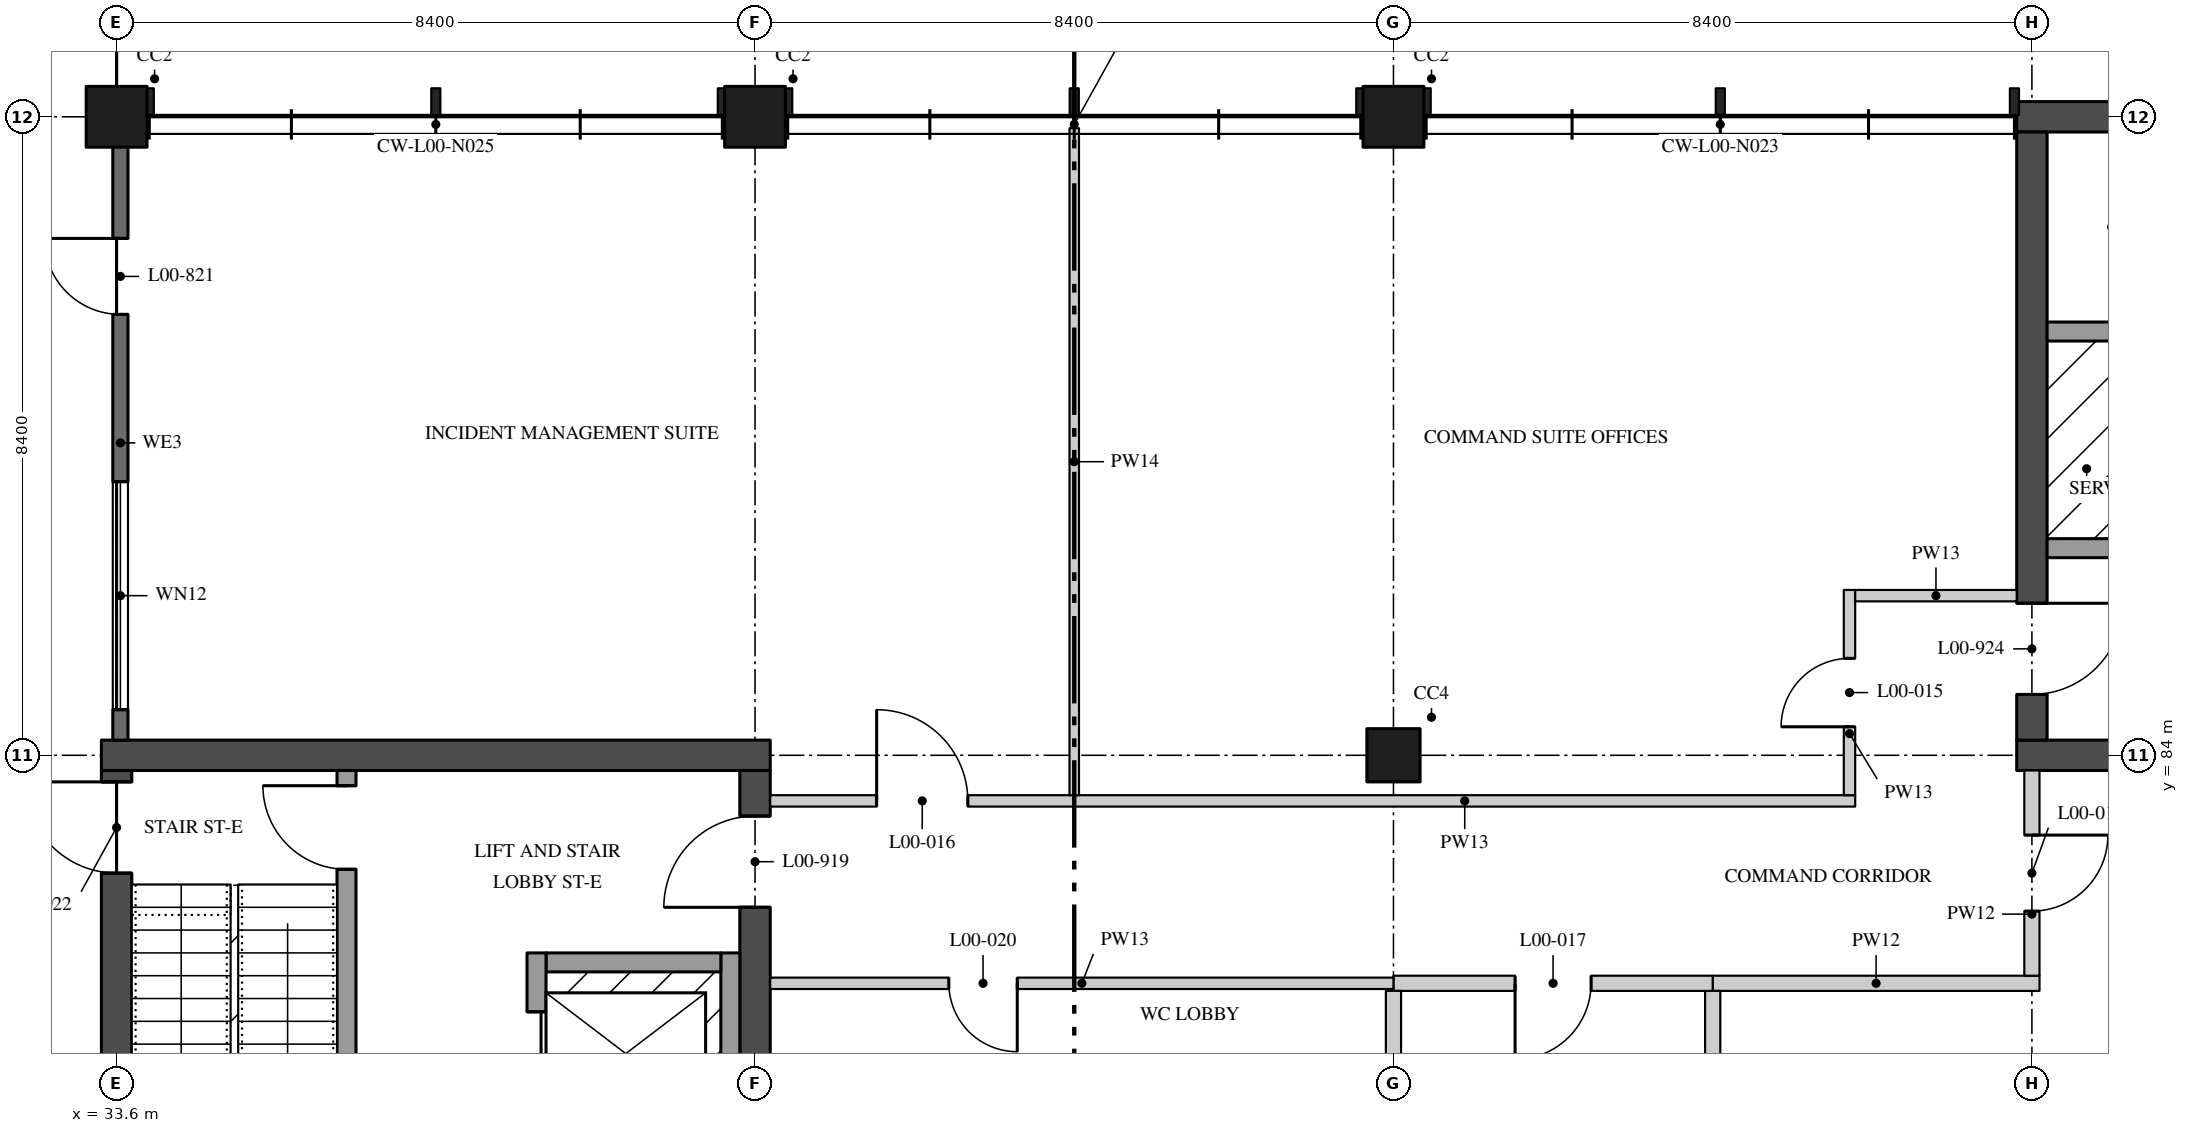
"""IFC4 building model, lengths in metres.
Left out: names, types, materials, properties, quantities, classifications, styles, units other than length and angle.
Written with IfcOpenShell. Run it as: python <this file> out.ifc"""

import sys

from ifc_helpers import new_model, si_unit, direction, frame, frame_2d, origin, origin_2d, place, context, subcontext, project, spatial, rectangle, extrude, element, fill, save


model = new_model("IFC4")
c1 = context("Model", 3, precision=1e-05, world=origin(), true_north=direction((0.0, 1.0)))
c2 = subcontext(c1, "Body", "Model", "MODEL_VIEW")
j1 = project(units=[si_unit("LENGTHUNIT", "METRE"), si_unit("PLANEANGLEUNIT", "RADIAN")], contexts=[c1])
p1 = place(None, origin())
s1 = spatial("IfcSite", under=j1, at=p1, CompositionType="ELEMENT")
p2 = place(p1, origin())
s2 = spatial("IfcBuilding", under=s1, at=p2, CompositionType="ELEMENT")
p3 = place(p2, origin())
s3 = spatial("IfcBuildingStorey", under=s2, at=p3, CompositionType="ELEMENT", Elevation=0.0)
for number, where, z_axis, x_axis in (
    (1, (33.6, 92.4, 0.0), (0.0, 0.0, 1.0), (1.0, 0.0, 0.0)),
    (2, (42.0, 92.4, 0.0), (0.0, 0.0, 1.0), (1.0, 0.0, 0.0)),
):
    element("IfcColumn", number, at=place(p3, frame(where, z_axis=z_axis, x_axis=x_axis)), inside=s3, PredefinedType="COLUMN", context=c2, shape_type="SweptSolid", body=[
        extrude(rectangle(XDim=0.8, YDim=0.8, at=origin_2d()), origin(), (0.0, 0.0, 1.0), 5.05),
    ])
p4 = place(p3, frame((50.4, 84.0, 0.0), z_axis=(0.0, 0.0, 1.0), x_axis=(1.0, 0.0, 0.0)))
e3 = element("IfcColumn", 3, at=p4, inside=s3, PredefinedType="COLUMN", context=c2, shape_type="SweptSolid", body=[
    extrude(rectangle(XDim=0.7, YDim=0.7, at=origin_2d()), origin(), (0.0, 0.0, 1.0), 5.05),
])
p5 = place(p3, frame((50.4, 92.4, 0.0), z_axis=(0.0, 0.0, 1.0), x_axis=(1.0, 0.0, 0.0)))
e4 = element("IfcColumn", 4, at=p5, inside=s3, PredefinedType="COLUMN", context=c2, shape_type="SweptSolid", body=[
    extrude(rectangle(XDim=0.8, YDim=0.8, at=origin_2d()), origin(), (0.0, 0.0, 1.0), 5.05),
])
p6 = place(p3, frame((33.4, 84.0, 0.0), z_axis=(0.0, 0.0, 1.0), x_axis=(1.0, 0.0, 0.0)))
e5 = element("IfcWall", 5, at=p6, inside=s3, PredefinedType="SHEAR", context=c2, shape_type="SweptSolid", body=[
    extrude(rectangle(XDim=8.8, YDim=0.4, at=frame_2d((4.4, 0.0))), origin(), (0.0, 0.0, 1.0), 5.05),
])
p7 = place(p3, frame((33.6, 75.8, 0.0), z_axis=(0.0, 0.0, 1.0), x_axis=(0.0, 1.0, 0.0)))
e6 = element("IfcWall", 6, at=p7, inside=s3, PredefinedType="SHEAR", context=c2, shape_type="SweptSolid", body=[
    extrude(rectangle(XDim=8.0, YDim=0.4, at=frame_2d((4.0, 0.0))), origin(), (0.0, 0.0, 1.0), 5.05),
])
p8 = place(p7, frame((6.65, 0.0, 0.0)))
e7 = element("IfcOpeningElement", 7, at=p8, cuts=e6, PredefinedType="OPENING", context=c2, shape_type="SweptSolid", body=[
    extrude(rectangle(XDim=1.2, YDim=2.1, at=frame_2d((0.6, 1.05))), frame((0.0, 0.21, 0.0), z_axis=(0.0, -1.0, 0.0), x_axis=(1.0, 0.0, 0.0)), (0.0, 0.0, 1.0), 0.42),
])
p9 = place(p3, frame((42.0, 75.8, 0.0), z_axis=(0.0, 0.0, 1.0), x_axis=(0.0, 1.0, 0.0)))
e8 = element("IfcWall", 8, at=p9, inside=s3, PredefinedType="SHEAR", context=c2, shape_type="SweptSolid", body=[
    extrude(rectangle(XDim=8.0, YDim=0.4, at=frame_2d((4.0, 0.0))), origin(), (0.0, 0.0, 1.0), 5.05),
])
p10 = place(p9, frame((6.2, 0.0, 0.0)))
e9 = element("IfcOpeningElement", 9, at=p10, cuts=e8, PredefinedType="OPENING", context=c2, shape_type="SweptSolid", body=[
    extrude(rectangle(XDim=1.2, YDim=2.1, at=frame_2d((0.6, 1.05))), frame((0.0, 0.21, 0.0), z_axis=(0.0, -1.0, 0.0), x_axis=(1.0, 0.0, 0.0)), (0.0, 0.0, 1.0), 0.42),
])
p11 = place(p3, frame((36.625, 83.8, 0.0), z_axis=(0.0, 0.0, 1.0), x_axis=(0.0, -1.0, 0.0)))
e10 = element("IfcWall", 10, at=p11, inside=s3, PredefinedType="SOLIDWALL", context=c2, shape_type="SweptSolid", body=[
    extrude(rectangle(XDim=8.0, YDim=0.25, at=frame_2d((4.0, 0.0))), origin(), (0.0, 0.0, 1.0), 5.05),
])
p12 = place(p11, frame((0.2, 0.0, 0.0)))
e11 = element("IfcOpeningElement", 11, at=p12, cuts=e10, PredefinedType="OPENING", context=c2, shape_type="SweptSolid", body=[
    extrude(rectangle(XDim=1.1, YDim=2.1, at=frame_2d((0.55, 1.05))), frame((0.0, 0.135, 0.0), z_axis=(0.0, -1.0, 0.0), x_axis=(1.0, 0.0, 0.0)), (0.0, 0.0, 1.0), 0.27),
])
for number, where, z_axis, x_axis in (
    (12, (58.6, 84.0, 0.0), (0.0, 0.0, 1.0), (1.0, 0.0, 0.0)),
    (13, (58.6, 92.4, 0.0), (0.0, 0.0, 1.0), (1.0, 0.0, 0.0)),
):
    element("IfcWall", number, at=place(p3, frame(where, z_axis=z_axis, x_axis=x_axis)), inside=s3, PredefinedType="SHEAR", context=c2, shape_type="SweptSolid", body=[
        extrude(rectangle(XDim=8.8, YDim=0.4, at=frame_2d((4.4, 0.0))), origin(), (0.0, 0.0, 1.0), 5.05),
    ])
p13 = place(p3, frame((58.8, 84.2, 0.0), z_axis=(0.0, 0.0, 1.0), x_axis=(0.0, 1.0, 0.0)))
e14 = element("IfcWall", 14, at=p13, inside=s3, PredefinedType="SHEAR", context=c2, shape_type="SweptSolid", body=[
    extrude(rectangle(XDim=8.0, YDim=0.4, at=frame_2d((4.0, 0.0))), origin(), (0.0, 0.0, 1.0), 5.05),
])
p14 = place(p13, frame((0.6, 0.0, 0.0)))
e15 = element("IfcOpeningElement", 15, at=p14, cuts=e14, PredefinedType="OPENING", context=c2, shape_type="SweptSolid", body=[
    extrude(rectangle(XDim=1.2, YDim=2.1, at=frame_2d((0.6, 1.05))), frame((0.0, 0.21, 0.0), z_axis=(0.0, -1.0, 0.0), x_axis=(1.0, 0.0, 0.0)), (0.0, 0.0, 1.0), 0.42),
])
p15 = place(p3, frame((61.8, 86.725, 0.0), z_axis=(0.0, 0.0, 1.0), x_axis=(-1.0, 0.0, 0.0)))
e16 = element("IfcWall", 16, at=p15, inside=s3, PredefinedType="SOLIDWALL", context=c2, shape_type="SweptSolid", body=[
    extrude(rectangle(XDim=2.8, YDim=0.25, at=frame_2d((1.4, 0.0))), origin(), (0.0, 0.0, 1.0), 5.05),
])
p16 = place(p3, frame((61.55, 89.575, 0.0), z_axis=(0.0, 0.0, 1.0), x_axis=(-1.0, 0.0, 0.0)))
e17 = element("IfcWall", 17, at=p16, inside=s3, PredefinedType="SOLIDWALL", context=c2, shape_type="SweptSolid", body=[
    extrude(rectangle(XDim=2.55, YDim=0.25, at=frame_2d((1.275, 0.0))), origin(), (0.0, 0.0, 1.0), 5.05),
])
p17 = place(p3, frame((41.675, 78.75, 0.0), z_axis=(0.0, 0.0, 1.0), x_axis=(0.0, 1.0, 0.0)))
e18 = element("IfcWall", 18, at=p17, inside=s3, PredefinedType="SOLIDWALL", context=c2, shape_type="SweptSolid", body=[
    extrude(rectangle(XDim=2.65, YDim=0.25, at=frame_2d((1.325, 0.0))), origin(), (0.0, 0.0, 1.0), 5.05),
])
p18 = place(p3, frame((39.25, 81.275, 0.0), z_axis=(0.0, 0.0, 1.0), x_axis=(1.0, 0.0, 0.0)))
e19 = element("IfcWall", 19, at=p18, inside=s3, PredefinedType="SOLIDWALL", context=c2, shape_type="SweptSolid", body=[
    extrude(rectangle(XDim=2.3, YDim=0.25, at=frame_2d((1.15, 0.0))), origin(), (0.0, 0.0, 1.0), 5.05),
])
p19 = place(p3, frame((39.125, 78.75, 0.0), z_axis=(0.0, 0.0, 1.0), x_axis=(0.0, 1.0, 0.0)))
e20 = element("IfcWall", 20, at=p19, inside=s3, PredefinedType="SOLIDWALL", context=c2, shape_type="SweptSolid", body=[
    extrude(rectangle(XDim=2.65, YDim=0.25, at=frame_2d((1.325, 0.0))), origin(), (0.0, 0.0, 1.0), 5.05),
])
p20 = place(p19, frame((0.775, 0.0, 0.0)))
e21 = element("IfcOpeningElement", 21, at=p20, cuts=e20, PredefinedType="OPENING", context=c2, shape_type="SweptSolid", body=[
    extrude(rectangle(XDim=1.1, YDim=2.1, at=frame_2d((0.55, 1.05))), frame((0.0, 0.135, 0.0), z_axis=(0.0, -1.0, 0.0), x_axis=(1.0, 0.0, 0.0)), (0.0, 0.0, 1.0), 0.27),
])
p21 = place(p3, frame((54.6, 81.0, 0.0), z_axis=(0.0, 0.0, 1.0), x_axis=(1.0, 0.0, 0.0)))
e22 = element("IfcWall", 22, at=p21, inside=s3, PredefinedType="PARTITIONING", context=c2, shape_type="SweptSolid", body=[
    extrude(rectangle(XDim=4.3, YDim=0.2, at=frame_2d((2.15, 0.0))), origin(), (0.0, 0.0, 1.0), 5.05),
])
p22 = place(p3, frame((58.8, 81.1, 0.0), z_axis=(0.0, 0.0, 1.0), x_axis=(0.0, 1.0, 0.0)))
e23 = element("IfcWall", 23, at=p22, inside=s3, PredefinedType="PARTITIONING", context=c2, shape_type="SweptSolid", body=[
    extrude(rectangle(XDim=2.7, YDim=0.2, at=frame_2d((1.35, 0.0))), origin(), (0.0, 0.0, 1.0), 5.05),
])
p23 = place(p22, frame((0.85, 0.0, 0.0)))
e24 = element("IfcOpeningElement", 24, at=p23, cuts=e23, PredefinedType="OPENING", context=c2, shape_type="SweptSolid", body=[
    extrude(rectangle(XDim=1.0, YDim=2.1, at=frame_2d((0.5, 1.05))), frame((0.0, 0.11, 0.0), z_axis=(0.0, -1.0, 0.0), x_axis=(1.0, 0.0, 0.0)), (0.0, 0.0, 1.0), 0.22),
])
p24 = place(p3, frame((54.6, 75.75, 0.0), z_axis=(0.0, 0.0, 1.0), x_axis=(0.0, 1.0, 0.0)))
e25 = element("IfcWall", 25, at=p24, inside=s3, PredefinedType="PARTITIONING", context=c2, shape_type="SweptSolid", body=[
    extrude(rectangle(XDim=5.15, YDim=0.2, at=frame_2d((2.575, 0.0))), origin(), (0.0, 0.0, 1.0), 5.05),
])
p25 = place(p3, frame((46.2, 83.4, 0.0), z_axis=(0.0, 0.0, 1.0), x_axis=(1.0, 0.0, 0.0)))
e26 = element("IfcWall", 26, at=p25, inside=s3, PredefinedType="PARTITIONING", context=c2, shape_type="SweptSolid", body=[
    extrude(rectangle(XDim=10.275, YDim=0.15, at=frame_2d((5.138, 0.0))), origin(), (0.0, 0.0, 1.0), 5.05),
])
p26 = place(p3, frame((56.4, 83.475, 0.0), z_axis=(0.0, 0.0, 1.0), x_axis=(0.0, 1.0, 0.0)))
e27 = element("IfcWall", 27, at=p26, inside=s3, PredefinedType="PARTITIONING", context=c2, shape_type="SweptSolid", body=[
    extrude(rectangle(XDim=2.7, YDim=0.15, at=frame_2d((1.35, 0.0))), origin(), (0.0, 0.0, 1.0), 5.05),
])
p27 = place(p26, frame((0.9, 0.0, 0.0)))
e28 = element("IfcOpeningElement", 28, at=p27, cuts=e27, PredefinedType="OPENING", context=c2, shape_type="SweptSolid", body=[
    extrude(rectangle(XDim=0.9, YDim=2.1, at=frame_2d((0.45, 1.05))), frame((0.0, 0.085, 0.0), z_axis=(0.0, -1.0, 0.0), x_axis=(1.0, 0.0, 0.0)), (0.0, 0.0, 1.0), 0.17),
])
p28 = place(p3, frame((56.475, 86.1, 0.0), z_axis=(0.0, 0.0, 1.0), x_axis=(1.0, 0.0, 0.0)))
e29 = element("IfcWall", 29, at=p28, inside=s3, PredefinedType="PARTITIONING", context=c2, shape_type="SweptSolid", body=[
    extrude(rectangle(XDim=2.125, YDim=0.15, at=frame_2d((1.062, 0.0))), origin(), (0.0, 0.0, 1.0), 5.05),
])
p29 = place(p3, frame((42.2, 83.4, 0.0), z_axis=(0.0, 0.0, 1.0), x_axis=(1.0, 0.0, 0.0)))
e30 = element("IfcWall", 30, at=p29, inside=s3, PredefinedType="PARTITIONING", context=c2, shape_type="SweptSolid", body=[
    extrude(rectangle(XDim=4.0, YDim=0.15, at=frame_2d((2.0, 0.0))), origin(), (0.0, 0.0, 1.0), 5.05),
])
p30 = place(p29, frame((1.4, 0.0, 0.0)))
e31 = element("IfcOpeningElement", 31, at=p30, cuts=e30, PredefinedType="OPENING", context=c2, shape_type="SweptSolid", body=[
    extrude(rectangle(XDim=1.2, YDim=2.4, at=frame_2d((0.6, 1.2))), frame((0.0, 0.085, 0.0), z_axis=(0.0, -1.0, 0.0), x_axis=(1.0, 0.0, 0.0)), (0.0, 0.0, 1.0), 0.17),
])
p31 = place(p3, frame((50.4, 81.0, 0.0), z_axis=(0.0, 0.0, 1.0), x_axis=(1.0, 0.0, 0.0)))
e32 = element("IfcWall", 32, at=p31, inside=s3, PredefinedType="PARTITIONING", context=c2, shape_type="SweptSolid", body=[
    extrude(rectangle(XDim=4.2, YDim=0.2, at=frame_2d((2.1, 0.0))), origin(), (0.0, 0.0, 1.0), 5.05),
])
p32 = place(p31, frame((1.6, 0.0, 0.0)))
e33 = element("IfcOpeningElement", 33, at=p32, cuts=e32, PredefinedType="OPENING", context=c2, shape_type="SweptSolid", body=[
    extrude(rectangle(XDim=1.0, YDim=2.1, at=frame_2d((0.5, 1.05))), frame((0.0, 0.11, 0.0), z_axis=(0.0, -1.0, 0.0), x_axis=(1.0, 0.0, 0.0)), (0.0, 0.0, 1.0), 0.22),
])
p33 = place(p3, frame((42.2, 81.0, 0.0), z_axis=(0.0, 0.0, 1.0), x_axis=(1.0, 0.0, 0.0)))
e34 = element("IfcWall", 34, at=p33, inside=s3, PredefinedType="PARTITIONING", context=c2, shape_type="SweptSolid", body=[
    extrude(rectangle(XDim=8.2, YDim=0.15, at=frame_2d((4.1, 0.0))), origin(), (0.0, 0.0, 1.0), 5.05),
])
p34 = place(p33, frame((2.35, 0.0, 0.0)))
e35 = element("IfcOpeningElement", 35, at=p34, cuts=e34, PredefinedType="OPENING", context=c2, shape_type="SweptSolid", body=[
    extrude(rectangle(XDim=0.9, YDim=2.1, at=frame_2d((0.45, 1.05))), frame((0.0, 0.085, 0.0), z_axis=(0.0, -1.0, 0.0), x_axis=(1.0, 0.0, 0.0)), (0.0, 0.0, 1.0), 0.17),
])
p35 = place(p3, frame((46.2, 83.475, 0.0), z_axis=(0.0, 0.0, 1.0), x_axis=(0.0, 1.0, 0.0)))
e36 = element("IfcWall", 36, at=p35, inside=s3, PredefinedType="PARTITIONING", context=c2, shape_type="SweptSolid", body=[
    extrude(rectangle(XDim=8.775, YDim=0.125, at=frame_2d((4.387, 0.0))), origin(), (0.0, 0.0, 1.0), 5.05),
])
p36 = place(p3, frame((50.4, 78.6, 0.0), z_axis=(0.0, 0.0, 1.0), x_axis=(0.0, 1.0, 0.0)))
e37 = element("IfcWall", 37, at=p36, inside=s3, PredefinedType="PARTITIONING", context=c2, shape_type="SweptSolid", body=[
    extrude(rectangle(XDim=2.3, YDim=0.2, at=frame_2d((1.15, 0.0))), origin(), (0.0, 0.0, 1.0), 5.05),
])
p37 = place(p3, frame((33.65, 92.02, 0.0), z_axis=(0.0, 0.0, 1.0), x_axis=(0.0, -1.0, 0.0)))
e38 = element("IfcWall", 38, at=p37, inside=s3, PredefinedType="SOLIDWALL", context=c2, shape_type="SweptSolid", body=[
    extrude(rectangle(XDim=7.82, YDim=0.2, at=frame_2d((3.91, 0.0))), origin(), (0.0, 0.0, 1.0), 5.05),
])
p38 = place(p37, frame((1.22, 0.0, 0.0)))
e39 = element("IfcOpeningElement", 39, at=p38, cuts=e38, PredefinedType="OPENING", context=c2, shape_type="SweptSolid", body=[
    extrude(rectangle(XDim=1.0, YDim=2.4, at=frame_2d((0.5, 1.2))), frame((0.0, 0.11, 0.0), z_axis=(0.0, -1.0, 0.0), x_axis=(1.0, 0.0, 0.0)), (0.0, 0.0, 1.0), 0.22),
])
p39 = place(p37, frame((4.42, 0.0, 0.9)))
e40 = element("IfcOpeningElement", 40, at=p39, cuts=e38, PredefinedType="OPENING", context=c2, shape_type="SweptSolid", body=[
    extrude(rectangle(XDim=3.0, YDim=2.85, at=frame_2d((1.5, 1.425))), frame((0.0, 0.11, 0.0), z_axis=(0.0, -1.0, 0.0), x_axis=(1.0, 0.0, 0.0)), (0.0, 0.0, 1.0), 0.22),
])
p40 = place(p10, origin())
e41 = element("IfcDoor", 41, at=p40, inside=s3, OperationType="SINGLE_SWING_RIGHT", PredefinedType="DOOR", context=c2, shape_type="SweptSolid", body=[
    extrude(rectangle(XDim=1.2, YDim=2.1, at=frame_2d((0.6, 1.05))), frame((0.0, 0.035, 0.0), z_axis=(0.0, -1.0, 0.0), x_axis=(1.0, 0.0, 0.0)), (0.0, 0.0, 1.0), 0.07),
])
fill(e9, e41)
p41 = place(p12, frame((1.1, 0.0, 0.0), z_axis=(0.0, 0.0, 1.0), x_axis=(-1.0, 0.0, 0.0)))
e42 = element("IfcDoor", 42, at=p41, inside=s3, OperationType="SINGLE_SWING_LEFT", PredefinedType="DOOR", context=c2, shape_type="SweptSolid", body=[
    extrude(rectangle(XDim=1.1, YDim=2.1, at=frame_2d((0.55, 1.05))), frame((0.0, 0.035, 0.0), z_axis=(0.0, -1.0, 0.0), x_axis=(1.0, 0.0, 0.0)), (0.0, 0.0, 1.0), 0.07),
])
fill(e11, e42)
p42 = place(p8, origin())
e43 = element("IfcDoor", 43, at=p42, inside=s3, OperationType="SINGLE_SWING_LEFT", PredefinedType="DOOR", context=c2, shape_type="SweptSolid", body=[
    extrude(rectangle(XDim=1.2, YDim=2.1, at=frame_2d((0.6, 1.05))), frame((0.0, 0.035, 0.0), z_axis=(0.0, -1.0, 0.0), x_axis=(1.0, 0.0, 0.0)), (0.0, 0.0, 1.0), 0.07),
])
fill(e7, e43)
p43 = place(p14, frame((1.2, 0.0, 0.0), z_axis=(0.0, 0.0, 1.0), x_axis=(-1.0, 0.0, 0.0)))
e44 = element("IfcDoor", 44, at=p43, inside=s3, OperationType="SINGLE_SWING_RIGHT", PredefinedType="DOOR", context=c2, shape_type="SweptSolid", body=[
    extrude(rectangle(XDim=1.2, YDim=2.1, at=frame_2d((0.6, 1.05))), frame((0.0, 0.035, 0.0), z_axis=(0.0, -1.0, 0.0), x_axis=(1.0, 0.0, 0.0)), (0.0, 0.0, 1.0), 0.07),
])
fill(e15, e44)
p44 = place(p20, origin())
e45 = element("IfcDoor", 45, at=p44, inside=s3, OperationType="DOUBLE_DOOR_SLIDING", PredefinedType="DOOR", context=c2, shape_type="SweptSolid", body=[
    extrude(rectangle(XDim=1.1, YDim=2.1, at=frame_2d((0.55, 1.05))), frame((0.0, 0.04, 0.0), z_axis=(0.0, -1.0, 0.0), x_axis=(1.0, 0.0, 0.0)), (0.0, 0.0, 1.0), 0.08),
])
fill(e21, e45)
p45 = place(p23, frame((1.0, 0.0, 0.0), z_axis=(0.0, 0.0, 1.0), x_axis=(-1.0, 0.0, 0.0)))
e46 = element("IfcDoor", 46, at=p45, inside=s3, OperationType="SINGLE_SWING_RIGHT", PredefinedType="DOOR", context=c2, shape_type="SweptSolid", body=[
    extrude(rectangle(XDim=1.0, YDim=2.1, at=frame_2d((0.5, 1.05))), frame((0.0, 0.03, 0.0), z_axis=(0.0, -1.0, 0.0), x_axis=(1.0, 0.0, 0.0)), (0.0, 0.0, 1.0), 0.06),
])
fill(e24, e46)
p46 = place(p27, origin())
e47 = element("IfcDoor", 47, at=p46, inside=s3, OperationType="SINGLE_SWING_RIGHT", PredefinedType="DOOR", context=c2, shape_type="SweptSolid", body=[
    extrude(rectangle(XDim=0.9, YDim=2.1, at=frame_2d((0.45, 1.05))), frame((0.0, 0.025, 0.0), z_axis=(0.0, -1.0, 0.0), x_axis=(1.0, 0.0, 0.0)), (0.0, 0.0, 1.0), 0.05),
])
fill(e28, e47)
p47 = place(p30, origin())
e48 = element("IfcDoor", 48, at=p47, inside=s3, OperationType="SINGLE_SWING_RIGHT", PredefinedType="DOOR", context=c2, shape_type="SweptSolid", body=[
    extrude(rectangle(XDim=1.2, YDim=2.4, at=frame_2d((0.6, 1.2))), frame((0.0, 0.025, 0.0), z_axis=(0.0, -1.0, 0.0), x_axis=(1.0, 0.0, 0.0)), (0.0, 0.0, 1.0), 0.05),
])
fill(e31, e48)
p48 = place(p32, frame((1.0, 0.0, 0.0), z_axis=(0.0, 0.0, 1.0), x_axis=(-1.0, 0.0, 0.0)))
e49 = element("IfcDoor", 49, at=p48, inside=s3, OperationType="SINGLE_SWING_LEFT", PredefinedType="DOOR", context=c2, shape_type="SweptSolid", body=[
    extrude(rectangle(XDim=1.0, YDim=2.1, at=frame_2d((0.5, 1.05))), frame((0.0, 0.03, 0.0), z_axis=(0.0, -1.0, 0.0), x_axis=(1.0, 0.0, 0.0)), (0.0, 0.0, 1.0), 0.06),
])
fill(e33, e49)
p49 = place(p34, frame((0.9, 0.0, 0.0), z_axis=(0.0, 0.0, 1.0), x_axis=(-1.0, 0.0, 0.0)))
e50 = element("IfcDoor", 50, at=p49, inside=s3, OperationType="SINGLE_SWING_RIGHT", PredefinedType="DOOR", context=c2, shape_type="SweptSolid", body=[
    extrude(rectangle(XDim=0.9, YDim=2.1, at=frame_2d((0.45, 1.05))), frame((0.0, 0.025, 0.0), z_axis=(0.0, -1.0, 0.0), x_axis=(1.0, 0.0, 0.0)), (0.0, 0.0, 1.0), 0.05),
])
fill(e35, e50)
p50 = place(p38, frame((1.0, 0.0, 0.0), z_axis=(0.0, 0.0, 1.0), x_axis=(-1.0, 0.0, 0.0)))
e51 = element("IfcDoor", 51, at=p50, inside=s3, OperationType="SINGLE_SWING_LEFT", PredefinedType="DOOR", context=c2, shape_type="SweptSolid", body=[
    extrude(rectangle(XDim=1.0, YDim=2.4, at=frame_2d((0.5, 1.2))), frame((0.0, 0.025, 0.0), z_axis=(0.0, -1.0, 0.0), x_axis=(1.0, 0.0, 0.0)), (0.0, 0.0, 1.0), 0.05),
])
fill(e39, e51)
p51 = place(p39, origin())
e52 = element("IfcWindow", 52, at=p51, inside=s3, PartitioningType="SINGLE_PANEL", PredefinedType="WINDOW", context=c2, shape_type="SweptSolid", body=[
    extrude(rectangle(XDim=3.0, YDim=2.85, at=frame_2d((1.5, 1.425))), frame((0.0, 0.05, 0.0), z_axis=(0.0, -1.0, 0.0), x_axis=(1.0, 0.0, 0.0)), (0.0, 0.0, 1.0), 0.1),
])
fill(e40, e52)
save(model, sys.argv[1])
